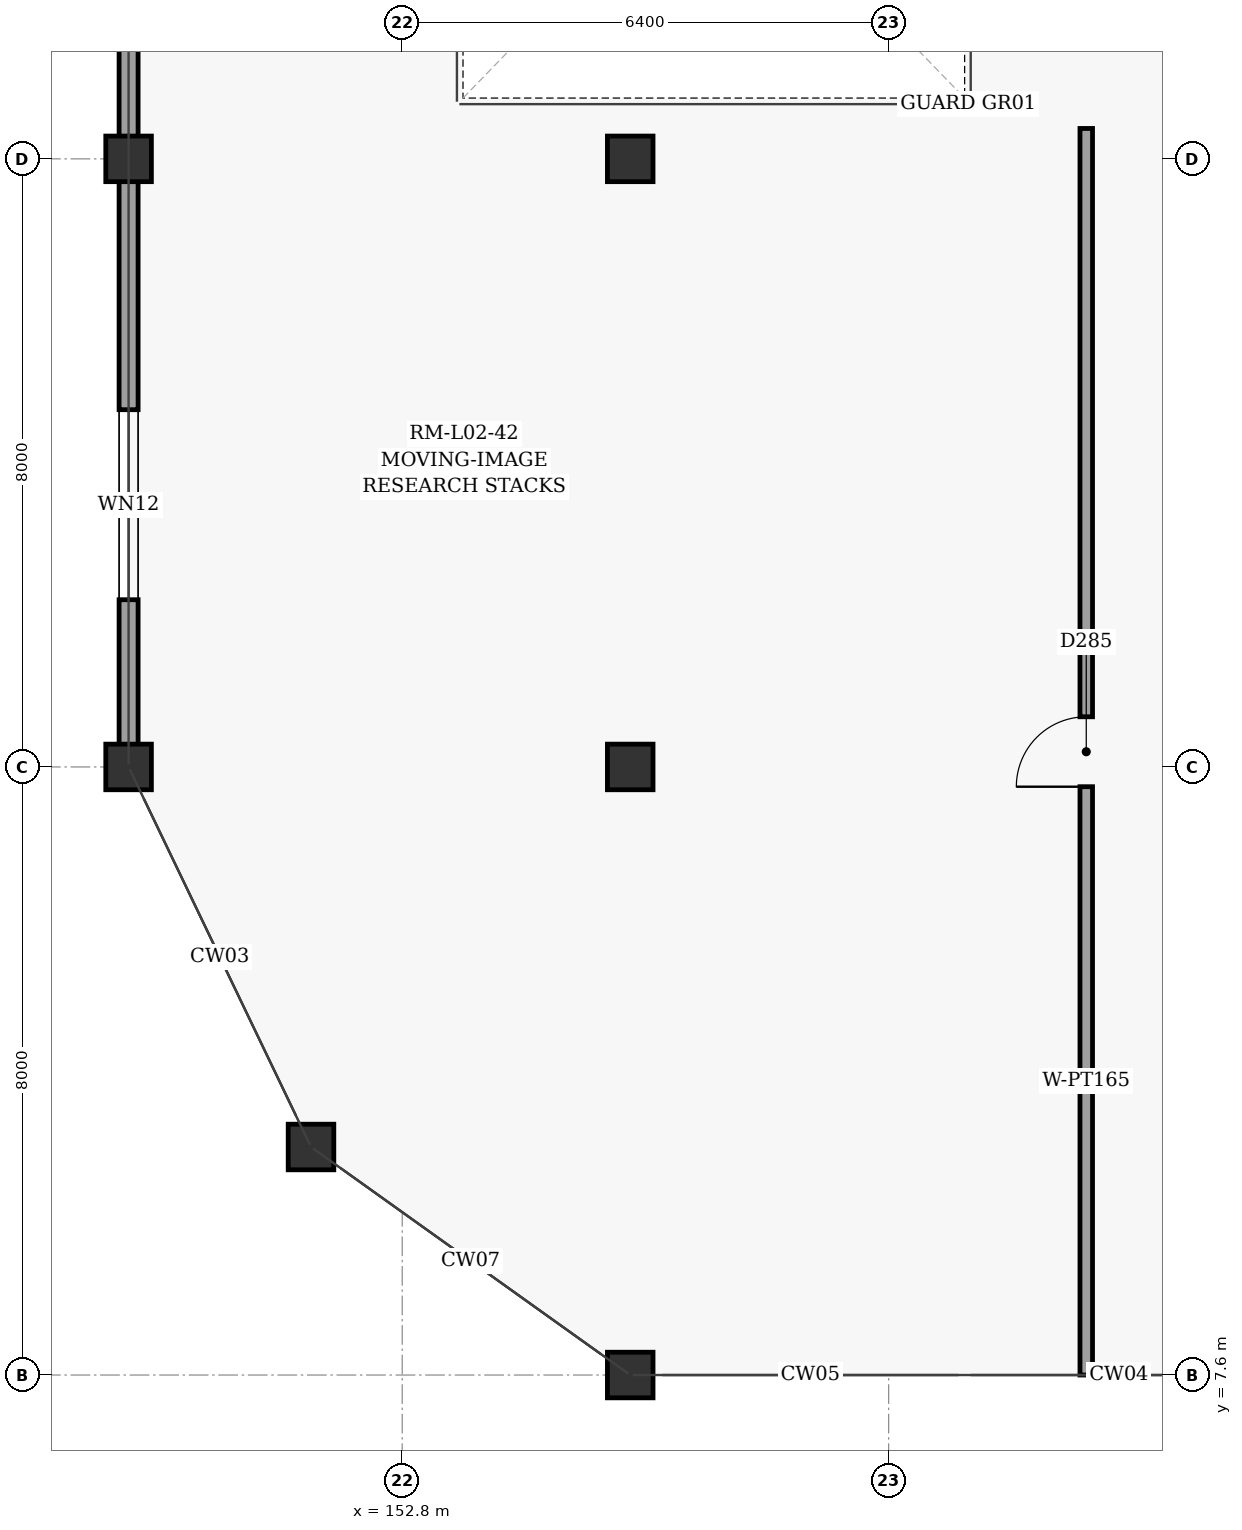
"""IFC4 building model, lengths in metres.
Left out: names, types, materials, properties, quantities, classifications, styles, units other than length and angle.
Written with IfcOpenShell. Run it as: python <this file> out.ifc"""

import sys

from ifc_helpers import new_model, si_unit, direction, frame, frame_2d, origin, origin_2d, place, context, subcontext, project, spatial, rectangle, extrude, element, fill, save


model = new_model("IFC4")
c1 = context("Model", 3, precision=1e-05, world=origin(), true_north=direction((0.0, 1.0)))
c2 = subcontext(c1, "Body", "Model", "MODEL_VIEW")
j1 = project(units=[si_unit("LENGTHUNIT", "METRE"), si_unit("PLANEANGLEUNIT", "RADIAN")], contexts=[c1])
p1 = place(None, origin())
s1 = spatial("IfcSite", under=j1, at=p1, CompositionType="ELEMENT")
p2 = place(p1, origin())
s2 = spatial("IfcBuilding", under=s1, at=p2, CompositionType="ELEMENT")
p3 = place(p2, frame((0.0, 0.0, 10.2)))
s3 = spatial("IfcBuildingStorey", under=s2, at=p3, CompositionType="ELEMENT", Elevation=10.2)
for number, where, z_axis, x_axis in (
    (1, (149.2, 15.6, 0.0), (0.0, 0.0, 1.0), (1.0, 0.0, 0.0)),
    (2, (149.2, 23.6, 0.0), (0.0, 0.0, 1.0), (1.0, 0.0, 0.0)),
    (3, (151.6, 10.6, 0.0), (0.0, 0.0, 1.0), (1.0, 0.0, 0.0)),
    (4, (155.8, 7.6, 0.0), (0.0, 0.0, 1.0), (1.0, 0.0, 0.0)),
    (5, (155.8, 15.6, 0.0), (0.0, 0.0, 1.0), (1.0, 0.0, 0.0)),
    (6, (155.8, 23.6, 0.0), (0.0, 0.0, 1.0), (1.0, 0.0, 0.0)),
):
    element("IfcColumn", number, at=place(p3, frame(where, z_axis=z_axis, x_axis=x_axis)), inside=s3, PredefinedType="COLUMN", context=c2, shape_type="SweptSolid", body=[
        extrude(rectangle(XDim=0.6, YDim=0.6, at=origin_2d()), origin(), (0.0, 0.0, 1.0), 5.4),
    ])
p4 = place(p3, frame((149.2, 15.6, 0.0), z_axis=(0.0, 0.0, 1.0), x_axis=(0.0, 1.0, 0.0)))
e7 = element("IfcWall", 7, at=p4, inside=s3, PredefinedType="SOLIDWALL", context=c2, shape_type="SweptSolid", body=[
    extrude(rectangle(XDim=48.0, YDim=0.25, at=frame_2d((24.0, 0.0))), origin(), (0.0, 0.0, 1.0), 4.3),
])
p5 = place(p4, frame((2.2, 0.0, 0.8)))
e8 = element("IfcOpeningElement", 8, at=p5, cuts=e7, PredefinedType="OPENING", context=c2, shape_type="SweptSolid", body=[
    extrude(rectangle(XDim=2.5, YDim=2.3, at=frame_2d((1.25, 1.15))), frame((0.0, 0.135, 0.0), z_axis=(0.0, -1.0, 0.0), x_axis=(1.0, 0.0, 0.0)), (0.0, 0.0, 1.0), 0.27),
])
p6 = place(p4, frame((9.6, 0.0, 0.8)))
e9 = element("IfcOpeningElement", 9, at=p6, cuts=e7, PredefinedType="OPENING", context=c2, shape_type="SweptSolid", body=[
    extrude(rectangle(XDim=1.6, YDim=2.75, at=frame_2d((0.8, 1.375))), frame((0.0, 0.135, 0.0), z_axis=(0.0, -1.0, 0.0), x_axis=(1.0, 0.0, 0.0)), (0.0, 0.0, 1.0), 0.27),
])
p7 = place(p4, frame((17.0, 0.0, 0.8)))
e10 = element("IfcOpeningElement", 10, at=p7, cuts=e7, PredefinedType="OPENING", context=c2, shape_type="SweptSolid", body=[
    extrude(rectangle(XDim=1.85, YDim=2.75, at=frame_2d((0.925, 1.375))), frame((0.0, 0.135, 0.0), z_axis=(0.0, -1.0, 0.0), x_axis=(1.0, 0.0, 0.0)), (0.0, 0.0, 1.0), 0.27),
])
p8 = place(p4, frame((25.15, 0.0, 0.8)))
e11 = element("IfcOpeningElement", 11, at=p8, cuts=e7, PredefinedType="OPENING", context=c2, shape_type="SweptSolid", body=[
    extrude(rectangle(XDim=2.15, YDim=2.8, at=frame_2d((1.075, 1.4))), frame((0.0, 0.135, 0.0), z_axis=(0.0, -1.0, 0.0), x_axis=(1.0, 0.0, 0.0)), (0.0, 0.0, 1.0), 0.27),
])
p9 = place(p4, frame((32.55, 0.0, 0.8)))
e12 = element("IfcOpeningElement", 12, at=p9, cuts=e7, PredefinedType="OPENING", context=c2, shape_type="SweptSolid", body=[
    extrude(rectangle(XDim=2.45, YDim=2.8, at=frame_2d((1.225, 1.4))), frame((0.0, 0.135, 0.0), z_axis=(0.0, -1.0, 0.0), x_axis=(1.0, 0.0, 0.0)), (0.0, 0.0, 1.0), 0.27),
])
p10 = place(p4, frame((40.65, 0.0, 0.8)))
e13 = element("IfcOpeningElement", 13, at=p10, cuts=e7, PredefinedType="OPENING", context=c2, shape_type="SweptSolid", body=[
    extrude(rectangle(XDim=2.75, YDim=2.85, at=frame_2d((1.375, 1.425))), frame((0.0, 0.135, 0.0), z_axis=(0.0, -1.0, 0.0), x_axis=(1.0, 0.0, 0.0)), (0.0, 0.0, 1.0), 0.27),
])
p11 = place(p3, frame((161.8, 7.6, 0.0), z_axis=(0.0, 0.0, 1.0), x_axis=(0.0, 1.0, 0.0)))
e14 = element("IfcWall", 14, at=p11, inside=s3, PredefinedType="PARTITIONING", context=c2, shape_type="SweptSolid", body=[
    extrude(rectangle(XDim=16.4, YDim=0.165, at=frame_2d((8.2, 0.0))), origin(), (0.0, 0.0, 1.0), 5.15),
])
p12 = place(p11, frame((7.74, 0.0, 0.0)))
e15 = element("IfcOpeningElement", 15, at=p12, cuts=e14, PredefinedType="OPENING", context=c2, shape_type="SweptSolid", body=[
    extrude(rectangle(XDim=0.92, YDim=2.1, at=frame_2d((0.46, 1.05))), frame((0.0, 0.093, 0.0), z_axis=(0.0, -1.0, 0.0), x_axis=(1.0, 0.0, 0.0)), (0.0, 0.0, 1.0), 0.185),
])
p13 = place(p5, origin())
e16 = element("IfcWindow", 16, at=p13, inside=s3, PartitioningType="SINGLE_PANEL", PredefinedType="WINDOW", context=c2, shape_type="SweptSolid", body=[
    extrude(rectangle(XDim=2.5, YDim=2.3, at=frame_2d((1.25, 1.15))), frame((0.0, 0.03, 0.0), z_axis=(0.0, -1.0, 0.0), x_axis=(1.0, 0.0, 0.0)), (0.0, 0.0, 1.0), 0.06),
])
fill(e8, e16)
p14 = place(p12, origin())
e17 = element("IfcDoor", 17, at=p14, inside=s3, OperationType="SINGLE_SWING_LEFT", PredefinedType="DOOR", context=c2, shape_type="SweptSolid", body=[
    extrude(rectangle(XDim=0.92, YDim=2.1, at=frame_2d((0.46, 1.05))), frame((0.0, 0.025, 0.0), z_axis=(0.0, -1.0, 0.0), x_axis=(1.0, 0.0, 0.0)), (0.0, 0.0, 1.0), 0.05),
])
fill(e15, e17)
save(model, sys.argv[1])
